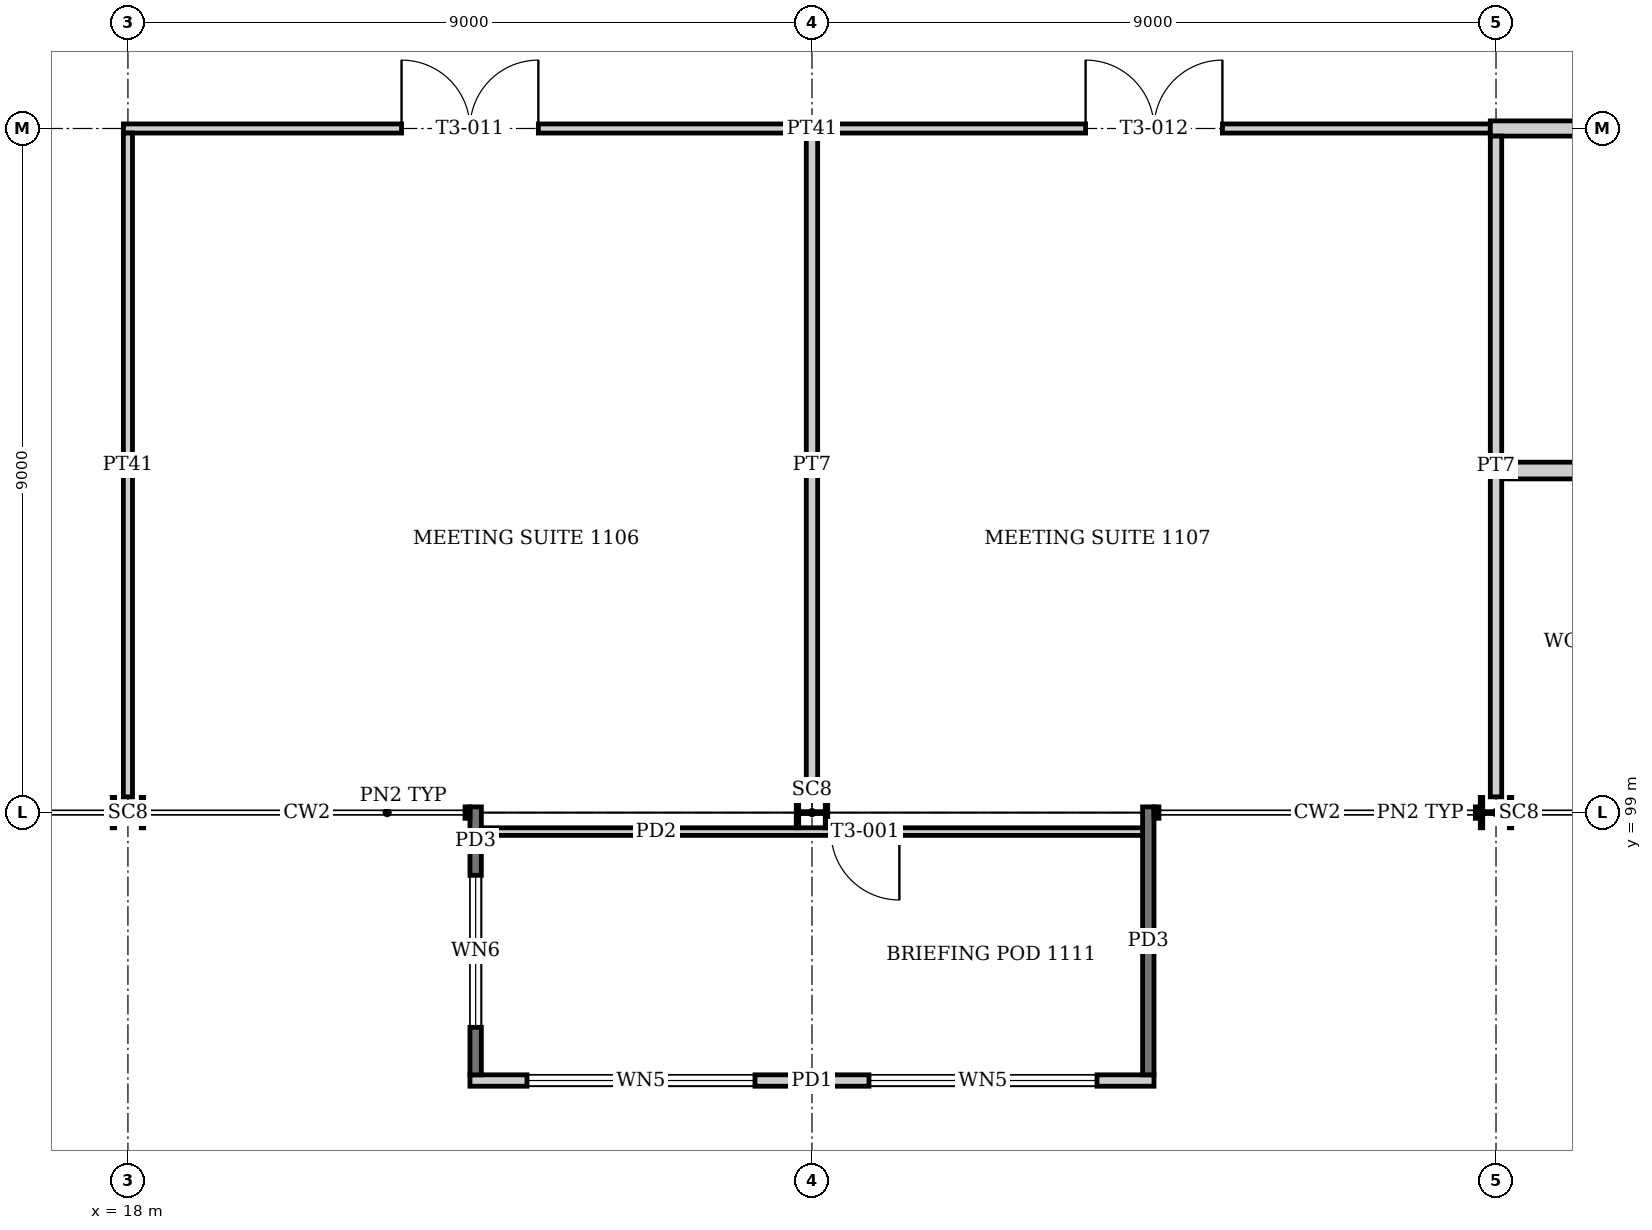
"""IFC4 building model, lengths in metres.
Left out: names, types, materials, properties, quantities, classifications, styles, units other than length and angle.
Written with IfcOpenShell. Run it as: python <this file> out.ifc"""

import sys

from ifc_helpers import new_model, si_unit, direction, frame, frame_2d, origin, origin_2d, place, context, subcontext, project, spatial, rectangle, i_section, extrude, element, fill, save


model = new_model("IFC4")
c1 = context("Model", 3, precision=1e-05, world=origin(), true_north=direction((0.0, 1.0)))
c2 = subcontext(c1, "Body", "Model", "MODEL_VIEW")
j1 = project(units=[si_unit("LENGTHUNIT", "METRE"), si_unit("PLANEANGLEUNIT", "RADIAN")], contexts=[c1])
p1 = place(None, origin())
s1 = spatial("IfcSite", under=j1, at=p1, CompositionType="ELEMENT")
p2 = place(p1, origin())
s2 = spatial("IfcBuilding", under=s1, at=p2, CompositionType="ELEMENT")
p3 = place(p2, frame((0.0, 0.0, 47.2)))
s3 = spatial("IfcBuildingStorey", under=s2, at=p3, CompositionType="ELEMENT", Elevation=47.2)
for number, where, z_axis, x_axis in (
    (1, (18.0, 99.0, 0.0), (0.0, 0.0, 1.0), (0.0, 1.0, 0.0)),
    (2, (27.0, 99.0, 0.0), (0.0, 0.0, 1.0), (0.0, 1.0, 0.0)),
    (3, (36.0, 99.0, 0.0), (0.0, 0.0, 1.0), (0.0, 1.0, 0.0)),
):
    element("IfcColumn", number, at=place(p3, frame(where, z_axis=z_axis, x_axis=x_axis)), inside=s3, PredefinedType="COLUMN", context=c2, shape_type="SweptSolid", body=[
        extrude(i_section(OverallWidth=0.4, OverallDepth=0.414, WebThickness=0.025, FlangeThickness=0.032, at=origin_2d()), origin(), (0.0, 0.0, 1.0), 4.0),
    ])
p4 = place(p3, frame((22.5, 95.475, 0.0), z_axis=(0.0, 0.0, 1.0), x_axis=(1.0, 0.0, 0.0)))
e4 = element("IfcWall", 4, at=p4, inside=s3, PredefinedType="SOLIDWALL", context=c2, shape_type="SweptSolid", body=[
    extrude(rectangle(XDim=9.0, YDim=0.15, at=frame_2d((4.5, 0.0))), origin(), (0.0, 0.0, 1.0), 2.6),
])
p5 = place(p4, frame((0.75, 0.0, 0.9)))
e5 = element("IfcOpeningElement", 5, at=p5, cuts=e4, PredefinedType="OPENING", context=c2, shape_type="SweptSolid", body=[
    extrude(rectangle(XDim=3.0, YDim=1.4, at=frame_2d((1.5, 0.7))), frame((0.0, 0.085, 0.0), z_axis=(0.0, -1.0, 0.0), x_axis=(1.0, 0.0, 0.0)), (0.0, 0.0, 1.0), 0.17),
])
p6 = place(p4, frame((5.25, 0.0, 0.9)))
e6 = element("IfcOpeningElement", 6, at=p6, cuts=e4, PredefinedType="OPENING", context=c2, shape_type="SweptSolid", body=[
    extrude(rectangle(XDim=3.0, YDim=1.4, at=frame_2d((1.5, 0.7))), frame((0.0, 0.085, 0.0), z_axis=(0.0, -1.0, 0.0), x_axis=(1.0, 0.0, 0.0)), (0.0, 0.0, 1.0), 0.17),
])
p7 = place(p3, frame((22.575, 95.55, -0.15), z_axis=(0.0, 0.0, 1.0), x_axis=(0.0, 1.0, 0.0)))
e7 = element("IfcWall", 7, at=p7, inside=s3, PredefinedType="SOLIDWALL", context=c2, shape_type="SweptSolid", body=[
    extrude(rectangle(XDim=3.525, YDim=0.15, at=frame_2d((1.762, 0.0))), origin(), (0.0, 0.0, 1.0), 2.75),
])
p8 = place(p7, frame((0.625, 0.0, 1.05)))
e8 = element("IfcOpeningElement", 8, at=p8, cuts=e7, PredefinedType="OPENING", context=c2, shape_type="SweptSolid", body=[
    extrude(rectangle(XDim=2.0, YDim=1.4, at=frame_2d((1.0, 0.7))), frame((0.0, 0.085, 0.0), z_axis=(0.0, -1.0, 0.0), x_axis=(1.0, 0.0, 0.0)), (0.0, 0.0, 1.0), 0.17),
])
p9 = place(p3, frame((31.425, 95.55, -0.15), z_axis=(0.0, 0.0, 1.0), x_axis=(0.0, 1.0, 0.0)))
e9 = element("IfcWall", 9, at=p9, inside=s3, PredefinedType="SOLIDWALL", context=c2, shape_type="SweptSolid", body=[
    extrude(rectangle(XDim=3.525, YDim=0.15, at=frame_2d((1.762, 0.0))), origin(), (0.0, 0.0, 1.0), 2.75),
])
p10 = place(p3, frame((22.65, 98.75, 0.0), z_axis=(0.0, 0.0, 1.0), x_axis=(1.0, 0.0, 0.0)))
e10 = element("IfcWall", 10, at=p10, inside=s3, PredefinedType="PARTITIONING", context=c2, shape_type="SweptSolid", body=[
    extrude(rectangle(XDim=8.7, YDim=0.1, at=frame_2d((4.35, 0.0))), origin(), (0.0, 0.0, 1.0), 2.6),
])
p11 = place(p10, frame((4.6, 0.0, 0.0)))
e11 = element("IfcOpeningElement", 11, at=p11, cuts=e10, PredefinedType="OPENING", context=c2, shape_type="SweptSolid", body=[
    extrude(rectangle(XDim=0.9, YDim=2.1, at=frame_2d((0.45, 1.05))), frame((0.0, 0.06, 0.0), z_axis=(0.0, -1.0, 0.0), x_axis=(1.0, 0.0, 0.0)), (0.0, 0.0, 1.0), 0.12),
])
p12 = place(p3, frame((36.075, 103.5, 0.0), z_axis=(0.0, 0.0, 1.0), x_axis=(1.0, 0.0, 0.0)))
e12 = element("IfcWall", 12, at=p12, inside=s3, PredefinedType="PLUMBINGWALL", context=c2, shape_type="SweptSolid", body=[
    extrude(rectangle(XDim=4.325, YDim=0.22, at=frame_2d((2.163, 0.0))), origin(), (0.0, 0.0, 1.0), 3.05),
])
p13 = place(p3, frame((17.94, 108.0, 0.0), z_axis=(0.0, 0.0, 1.0), x_axis=(1.0, 0.0, 0.0)))
e13 = element("IfcWall", 13, at=p13, inside=s3, PredefinedType="PARTITIONING", context=c2, shape_type="SweptSolid", body=[
    extrude(rectangle(XDim=17.985, YDim=0.12, at=frame_2d((8.993, 0.0))), origin(), (0.0, 0.0, 1.0), 3.05),
])
p14 = place(p13, frame((3.66, 0.0, 0.0)))
e14 = element("IfcOpeningElement", 14, at=p14, cuts=e13, PredefinedType="OPENING", context=c2, shape_type="SweptSolid", body=[
    extrude(rectangle(XDim=1.8, YDim=2.1, at=frame_2d((0.9, 1.05))), frame((0.0, 0.07, 0.0), z_axis=(0.0, -1.0, 0.0), x_axis=(1.0, 0.0, 0.0)), (0.0, 0.0, 1.0), 0.14),
])
p15 = place(p13, frame((12.66, 0.0, 0.0)))
e15 = element("IfcOpeningElement", 15, at=p15, cuts=e13, PredefinedType="OPENING", context=c2, shape_type="SweptSolid", body=[
    extrude(rectangle(XDim=1.8, YDim=2.1, at=frame_2d((0.9, 1.05))), frame((0.0, 0.07, 0.0), z_axis=(0.0, -1.0, 0.0), x_axis=(1.0, 0.0, 0.0)), (0.0, 0.0, 1.0), 0.14),
])
p16 = place(p3, frame((35.925, 108.0, 0.0), z_axis=(0.0, 0.0, 1.0), x_axis=(1.0, 0.0, 0.0)))
e16 = element("IfcWall", 16, at=p16, inside=s3, PredefinedType="PARTITIONING", context=c2, shape_type="SweptSolid", body=[
    extrude(rectangle(XDim=4.675, YDim=0.2, at=frame_2d((2.337, 0.0))), origin(), (0.0, 0.0, 1.0), 3.05),
])
p17 = place(p3, frame((18.0, 99.207, 0.0), z_axis=(0.0, 0.0, 1.0), x_axis=(0.0, 1.0, 0.0)))
e17 = element("IfcWall", 17, at=p17, inside=s3, PredefinedType="PARTITIONING", context=c2, shape_type="SweptSolid", body=[
    extrude(rectangle(XDim=8.733, YDim=0.12, at=frame_2d((4.366, 0.0))), origin(), (0.0, 0.0, 1.0), 3.05),
])
p18 = place(p3, frame((27.0, 99.207, 0.0), z_axis=(0.0, 0.0, 1.0), x_axis=(0.0, 1.0, 0.0)))
e18 = element("IfcWall", 18, at=p18, inside=s3, PredefinedType="PARTITIONING", context=c2, shape_type="SweptSolid", body=[
    extrude(rectangle(XDim=8.733, YDim=0.15, at=frame_2d((4.366, 0.0))), origin(), (0.0, 0.0, 1.0), 3.05),
])
p19 = place(p3, frame((36.0, 99.207, 0.0), z_axis=(0.0, 0.0, 1.0), x_axis=(0.0, 1.0, 0.0)))
e19 = element("IfcWall", 19, at=p19, inside=s3, PredefinedType="PARTITIONING", context=c2, shape_type="SweptSolid", body=[
    extrude(rectangle(XDim=8.693, YDim=0.15, at=frame_2d((4.346, 0.0))), origin(), (0.0, 0.0, 1.0), 3.05),
])
p20 = place(p5, origin())
e20 = element("IfcWindow", 20, at=p20, inside=s3, PartitioningType="SINGLE_PANEL", PredefinedType="WINDOW", context=c2, shape_type="SweptSolid", body=[
    extrude(rectangle(XDim=3.0, YDim=1.4, at=frame_2d((1.5, 0.7))), frame((0.0, 0.03, 0.0), z_axis=(0.0, -1.0, 0.0), x_axis=(1.0, 0.0, 0.0)), (0.0, 0.0, 1.0), 0.06),
])
fill(e5, e20)
p21 = place(p6, origin())
e21 = element("IfcWindow", 21, at=p21, inside=s3, PartitioningType="SINGLE_PANEL", PredefinedType="WINDOW", context=c2, shape_type="SweptSolid", body=[
    extrude(rectangle(XDim=3.0, YDim=1.4, at=frame_2d((1.5, 0.7))), frame((0.0, 0.03, 0.0), z_axis=(0.0, -1.0, 0.0), x_axis=(1.0, 0.0, 0.0)), (0.0, 0.0, 1.0), 0.06),
])
fill(e6, e21)
p22 = place(p8, origin())
e22 = element("IfcWindow", 22, at=p22, inside=s3, PartitioningType="SINGLE_PANEL", PredefinedType="WINDOW", context=c2, shape_type="SweptSolid", body=[
    extrude(rectangle(XDim=2.0, YDim=1.4, at=frame_2d((1.0, 0.7))), frame((0.0, 0.03, 0.0), z_axis=(0.0, -1.0, 0.0), x_axis=(1.0, 0.0, 0.0)), (0.0, 0.0, 1.0), 0.06),
])
fill(e8, e22)
p23 = place(p11, frame((0.9, 0.0, 0.0), z_axis=(0.0, 0.0, 1.0), x_axis=(-1.0, 0.0, 0.0)))
e23 = element("IfcDoor", 23, at=p23, inside=s3, OperationType="SINGLE_SWING_LEFT", PredefinedType="DOOR", context=c2, shape_type="SweptSolid", body=[
    extrude(rectangle(XDim=0.9, YDim=2.1, at=frame_2d((0.45, 1.05))), frame((0.0, 0.025, 0.0), z_axis=(0.0, -1.0, 0.0), x_axis=(1.0, 0.0, 0.0)), (0.0, 0.0, 1.0), 0.05),
])
fill(e11, e23)
p24 = place(p14, origin())
e24 = element("IfcDoor", 24, at=p24, inside=s3, OperationType="DOUBLE_DOOR_SINGLE_SWING", PredefinedType="DOOR", context=c2, shape_type="SweptSolid", body=[
    extrude(rectangle(XDim=1.8, YDim=2.1, at=frame_2d((0.9, 1.05))), frame((0.0, 0.025, 0.0), z_axis=(0.0, -1.0, 0.0), x_axis=(1.0, 0.0, 0.0)), (0.0, 0.0, 1.0), 0.05),
])
fill(e14, e24)
p25 = place(p15, origin())
e25 = element("IfcDoor", 25, at=p25, inside=s3, OperationType="DOUBLE_DOOR_SINGLE_SWING", PredefinedType="DOOR", context=c2, shape_type="SweptSolid", body=[
    extrude(rectangle(XDim=1.8, YDim=2.1, at=frame_2d((0.9, 1.05))), frame((0.0, 0.025, 0.0), z_axis=(0.0, -1.0, 0.0), x_axis=(1.0, 0.0, 0.0)), (0.0, 0.0, 1.0), 0.05),
])
fill(e15, e25)
save(model, sys.argv[1])
